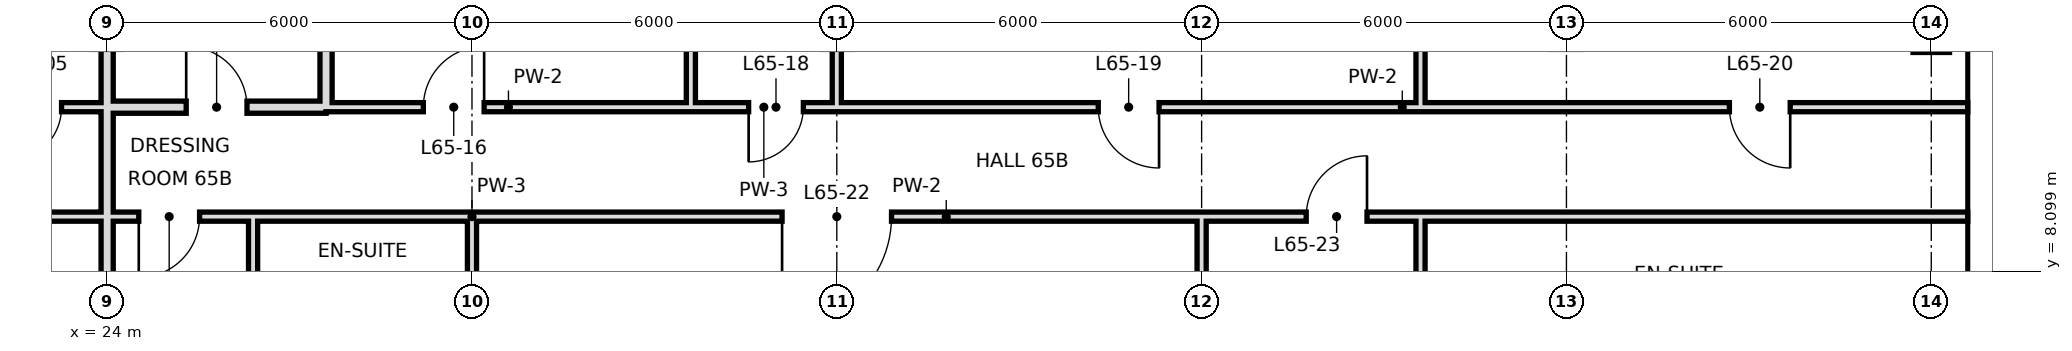
"""IFC4 building model, lengths in metres.
Left out: names, types, materials, properties, quantities, classifications, styles, units other than length and angle.
Written with IfcOpenShell. Run it as: python <this file> out.ifc"""

import sys

from ifc_helpers import new_model, si_unit, direction, frame, frame_2d, origin, place, context, subcontext, project, spatial, rectangle, extrude, element, fill, save


model = new_model("IFC4")
c1 = context("Model", 3, precision=1e-05, world=origin(), true_north=direction((0.0, 1.0)))
c2 = subcontext(c1, "Body", "Model", "MODEL_VIEW")
j1 = project(units=[si_unit("LENGTHUNIT", "METRE"), si_unit("PLANEANGLEUNIT", "RADIAN")], contexts=[c1])
p1 = place(None, origin())
s1 = spatial("IfcSite", under=j1, at=p1, CompositionType="ELEMENT")
p2 = place(p1, origin())
s2 = spatial("IfcBuilding", under=s1, at=p2, CompositionType="ELEMENT")
p3 = place(p2, frame((0.0, 0.0, 273.8)))
s3 = spatial("IfcBuildingStorey", under=s2, at=p3, CompositionType="ELEMENT", Elevation=273.8)
p4 = place(p3, frame((24.0, 10.8, 0.0), z_axis=(0.0, 0.0, 1.0), x_axis=(0.0, 1.0, 0.0)))
e1 = element("IfcWall", 1, at=p4, inside=s3, PredefinedType="SOLIDWALL", context=c2, shape_type="SweptSolid", body=[
    extrude(rectangle(XDim=7.9, YDim=0.2, at=frame_2d((3.95, 0.0))), origin(), (0.0, 0.0, 1.0), 2.72),
])
p5 = place(p3, frame((24.0, 0.0, 0.0), z_axis=(0.0, 0.0, 1.0), x_axis=(0.0, 1.0, 0.0)))
e2 = element("IfcWall", 2, at=p5, inside=s3, PredefinedType="SOLIDWALL", context=c2, shape_type="SweptSolid", body=[
    extrude(rectangle(XDim=10.8, YDim=0.2, at=frame_2d((5.4, 0.0))), origin(), (0.0, 0.0, 1.0), 2.72),
])
p6 = place(p3, frame((26.4, 6.0, 0.0), z_axis=(0.0, 0.0, 1.0), x_axis=(0.0, 1.0, 0.0)))
e3 = element("IfcWall", 3, at=p6, inside=s3, PredefinedType="PARTITIONING", context=c2, shape_type="SweptSolid", body=[
    extrude(rectangle(XDim=3.0, YDim=0.15, at=frame_2d((1.5, 0.0))), origin(), (0.0, 0.0, 1.0), 3.42),
])
p7 = place(p3, frame((27.6, 10.8, 0.0), z_axis=(0.0, 0.0, 1.0), x_axis=(0.0, 1.0, 0.0)))
e4 = element("IfcWall", 4, at=p7, inside=s3, PredefinedType="SOLIDWALL", context=c2, shape_type="SweptSolid", body=[
    extrude(rectangle(XDim=7.9, YDim=0.2, at=frame_2d((3.95, 0.0))), origin(), (0.0, 0.0, 1.0), 2.72),
])
p8 = place(p3, frame((30.0, 6.0, 0.0), z_axis=(0.0, 0.0, 1.0), x_axis=(0.0, 1.0, 0.0)))
e5 = element("IfcWall", 5, at=p8, inside=s3, PredefinedType="PARTITIONING", context=c2, shape_type="SweptSolid", body=[
    extrude(rectangle(XDim=3.0, YDim=0.15, at=frame_2d((1.5, 0.0))), origin(), (0.0, 0.0, 1.0), 2.72),
])
p9 = place(p3, frame((33.6, 10.8, 0.0), z_axis=(0.0, 0.0, 1.0), x_axis=(0.0, 1.0, 0.0)))
e6 = element("IfcWall", 6, at=p9, inside=s3, PredefinedType="PARTITIONING", context=c2, shape_type="SweptSolid", body=[
    extrude(rectangle(XDim=7.9, YDim=0.15, at=frame_2d((3.95, 0.0))), origin(), (0.0, 0.0, 1.0), 3.42),
])
p10 = place(p3, frame((36.0, 10.8, 0.0), z_axis=(0.0, 0.0, 1.0), x_axis=(0.0, 1.0, 0.0)))
e7 = element("IfcWall", 7, at=p10, inside=s3, PredefinedType="PARTITIONING", context=c2, shape_type="SweptSolid", body=[
    extrude(rectangle(XDim=7.9, YDim=0.15, at=frame_2d((3.95, 0.0))), origin(), (0.0, 0.0, 1.0), 2.72),
])
p11 = place(p3, frame((42.0, -0.6, 0.0), z_axis=(0.0, 0.0, 1.0), x_axis=(0.0, 1.0, 0.0)))
e8 = element("IfcWall", 8, at=p11, inside=s3, PredefinedType="PARTITIONING", context=c2, shape_type="SweptSolid", body=[
    extrude(rectangle(XDim=9.6, YDim=0.15, at=frame_2d((4.8, 0.0))), origin(), (0.0, 0.0, 1.0), 2.72),
])
p12 = place(p3, frame((45.6, 10.8, 0.0), z_axis=(0.0, 0.0, 1.0), x_axis=(0.0, 1.0, 0.0)))
e9 = element("IfcWall", 9, at=p12, inside=s3, PredefinedType="PARTITIONING", context=c2, shape_type="SweptSolid", body=[
    extrude(rectangle(XDim=7.2, YDim=0.15, at=frame_2d((3.6, 0.0))), origin(), (0.0, 0.0, 1.0), 3.42),
])
p13 = place(p3, frame((45.6, 6.0, 0.0), z_axis=(0.0, 0.0, 1.0), x_axis=(0.0, 1.0, 0.0)))
e10 = element("IfcWall", 10, at=p13, inside=s3, PredefinedType="PARTITIONING", context=c2, shape_type="SweptSolid", body=[
    extrude(rectangle(XDim=3.0, YDim=0.15, at=frame_2d((1.5, 0.0))), origin(), (0.0, 0.0, 1.0), 3.42),
])
p14 = place(p3, frame((24.0, 10.8, 0.0), z_axis=(0.0, 0.0, 1.0), x_axis=(1.0, 0.0, 0.0)))
e11 = element("IfcWall", 11, at=p14, inside=s3, PredefinedType="SOLIDWALL", context=c2, shape_type="SweptSolid", body=[
    extrude(rectangle(XDim=3.6, YDim=0.2, at=frame_2d((1.8, 0.0))), origin(), (0.0, 0.0, 1.0), 2.72),
])
p15 = place(p14, frame((1.3, 0.0, 0.0)))
e12 = element("IfcOpeningElement", 12, at=p15, cuts=e11, PredefinedType="OPENING", context=c2, shape_type="SweptSolid", body=[
    extrude(rectangle(XDim=1.0, YDim=2.4, at=frame_2d((0.5, 1.2))), frame((0.0, 0.11, 0.0), z_axis=(0.0, -1.0, 0.0), x_axis=(1.0, 0.0, 0.0)), (0.0, 0.0, 1.0), 0.22),
])
p16 = place(p3, frame((27.6, 10.8, 0.0), z_axis=(0.0, 0.0, 1.0), x_axis=(1.0, 0.0, 0.0)))
e13 = element("IfcWall", 13, at=p16, inside=s3, PredefinedType="PARTITIONING", context=c2, shape_type="SweptSolid", body=[
    extrude(rectangle(XDim=6.0, YDim=0.15, at=frame_2d((3.0, 0.0))), origin(), (0.0, 0.0, 1.0), 3.42),
])
p17 = place(p16, frame((1.6, 0.0, 0.0)))
e14 = element("IfcOpeningElement", 14, at=p17, cuts=e13, PredefinedType="OPENING", context=c2, shape_type="SweptSolid", body=[
    extrude(rectangle(XDim=1.0, YDim=2.4, at=frame_2d((0.5, 1.2))), frame((0.0, 0.085, 0.0), z_axis=(0.0, -1.0, 0.0), x_axis=(1.0, 0.0, 0.0)), (0.0, 0.0, 1.0), 0.17),
])
p18 = place(p3, frame((36.0, 10.8, 0.0), z_axis=(0.0, 0.0, 1.0), x_axis=(1.0, 0.0, 0.0)))
e15 = element("IfcWall", 15, at=p18, inside=s3, PredefinedType="PARTITIONING", context=c2, shape_type="SweptSolid", body=[
    extrude(rectangle(XDim=18.6, YDim=0.15, at=frame_2d((9.3, 0.0))), origin(), (0.0, 0.0, 1.0), 3.42),
])
p19 = place(p18, frame((4.3, 0.0, 0.0)))
e16 = element("IfcOpeningElement", 16, at=p19, cuts=e15, PredefinedType="OPENING", context=c2, shape_type="SweptSolid", body=[
    extrude(rectangle(XDim=1.0, YDim=2.4, at=frame_2d((0.5, 1.2))), frame((0.0, 0.085, 0.0), z_axis=(0.0, -1.0, 0.0), x_axis=(1.0, 0.0, 0.0)), (0.0, 0.0, 1.0), 0.17),
])
p20 = place(p18, frame((14.68, 0.0, 0.0)))
e17 = element("IfcOpeningElement", 17, at=p20, cuts=e15, PredefinedType="OPENING", context=c2, shape_type="SweptSolid", body=[
    extrude(rectangle(XDim=1.0, YDim=2.4, at=frame_2d((0.5, 1.2))), frame((0.0, 0.085, 0.0), z_axis=(0.0, -1.0, 0.0), x_axis=(1.0, 0.0, 0.0)), (0.0, 0.0, 1.0), 0.17),
])
p21 = place(p3, frame((21.6, 10.8, 0.0), z_axis=(0.0, 0.0, 1.0), x_axis=(1.0, 0.0, 0.0)))
e18 = element("IfcWall", 18, at=p21, inside=s3, PredefinedType="PARTITIONING", context=c2, shape_type="SweptSolid", body=[
    extrude(rectangle(XDim=2.4, YDim=0.15, at=frame_2d((1.2, 0.0))), origin(), (0.0, 0.0, 1.0), 3.42),
])
p22 = place(p21, frame((0.75, 0.0, 0.0)))
e19 = element("IfcOpeningElement", 19, at=p22, cuts=e18, PredefinedType="OPENING", context=c2, shape_type="SweptSolid", body=[
    extrude(rectangle(XDim=0.9, YDim=2.4, at=frame_2d((0.45, 1.2))), frame((0.0, 0.085, 0.0), z_axis=(0.0, -1.0, 0.0), x_axis=(1.0, 0.0, 0.0)), (0.0, 0.0, 1.0), 0.17),
])
p23 = place(p3, frame((33.6, 10.8, 0.0), z_axis=(0.0, 0.0, 1.0), x_axis=(1.0, 0.0, 0.0)))
e20 = element("IfcWall", 20, at=p23, inside=s3, PredefinedType="PARTITIONING", context=c2, shape_type="SweptSolid", body=[
    extrude(rectangle(XDim=2.4, YDim=0.15, at=frame_2d((1.2, 0.0))), origin(), (0.0, 0.0, 1.0), 3.42),
])
p24 = place(p23, frame((0.95, 0.0, 0.0)))
e21 = element("IfcOpeningElement", 21, at=p24, cuts=e20, PredefinedType="OPENING", context=c2, shape_type="SweptSolid", body=[
    extrude(rectangle(XDim=0.9, YDim=2.4, at=frame_2d((0.45, 1.2))), frame((0.0, 0.085, 0.0), z_axis=(0.0, -1.0, 0.0), x_axis=(1.0, 0.0, 0.0)), (0.0, 0.0, 1.0), 0.17),
])
p25 = place(p3, frame((24.0, 9.0, 0.0), z_axis=(0.0, 0.0, 1.0), x_axis=(1.0, 0.0, 0.0)))
e22 = element("IfcWall", 22, at=p25, inside=s3, PredefinedType="PARTITIONING", context=c2, shape_type="SweptSolid", body=[
    extrude(rectangle(XDim=2.4, YDim=0.15, at=frame_2d((1.2, 0.0))), origin(), (0.0, 0.0, 1.0), 3.42),
])
p26 = place(p25, frame((0.52, 0.0, 0.0)))
e23 = element("IfcOpeningElement", 23, at=p26, cuts=e22, PredefinedType="OPENING", context=c2, shape_type="SweptSolid", body=[
    extrude(rectangle(XDim=1.0, YDim=2.4, at=frame_2d((0.5, 1.2))), frame((0.0, 0.085, 0.0), z_axis=(0.0, -1.0, 0.0), x_axis=(1.0, 0.0, 0.0)), (0.0, 0.0, 1.0), 0.17),
])
p27 = place(p3, frame((30.0, 9.0, 0.0), z_axis=(0.0, 0.0, 1.0), x_axis=(1.0, 0.0, 0.0)))
e24 = element("IfcWall", 24, at=p27, inside=s3, PredefinedType="PARTITIONING", context=c2, shape_type="SweptSolid", body=[
    extrude(rectangle(XDim=15.6, YDim=0.15, at=frame_2d((7.8, 0.0))), origin(), (0.0, 0.0, 1.0), 3.42),
])
p28 = place(p27, frame((5.1, 0.0, 0.0)))
e25 = element("IfcOpeningElement", 25, at=p28, cuts=e24, PredefinedType="OPENING", context=c2, shape_type="SweptSolid", body=[
    extrude(rectangle(XDim=1.8, YDim=2.4, at=frame_2d((0.9, 1.2))), frame((0.0, 0.085, 0.0), z_axis=(0.0, -1.0, 0.0), x_axis=(1.0, 0.0, 0.0)), (0.0, 0.0, 1.0), 0.17),
])
p29 = place(p27, frame((13.72, 0.0, 0.0)))
e26 = element("IfcOpeningElement", 26, at=p29, cuts=e24, PredefinedType="OPENING", context=c2, shape_type="SweptSolid", body=[
    extrude(rectangle(XDim=1.0, YDim=2.4, at=frame_2d((0.5, 1.2))), frame((0.0, 0.085, 0.0), z_axis=(0.0, -1.0, 0.0), x_axis=(1.0, 0.0, 0.0)), (0.0, 0.0, 1.0), 0.17),
])
p30 = place(p3, frame((21.6, 9.0, 0.0), z_axis=(0.0, 0.0, 1.0), x_axis=(1.0, 0.0, 0.0)))
e27 = element("IfcWall", 27, at=p30, inside=s3, PredefinedType="PARTITIONING", context=c2, shape_type="SweptSolid", body=[
    extrude(rectangle(XDim=2.4, YDim=0.15, at=frame_2d((1.2, 0.0))), origin(), (0.0, 0.0, 1.0), 3.42),
])
p31 = place(p3, frame((26.4, 9.0, 0.0), z_axis=(0.0, 0.0, 1.0), x_axis=(1.0, 0.0, 0.0)))
e28 = element("IfcWall", 28, at=p31, inside=s3, PredefinedType="PARTITIONING", context=c2, shape_type="SweptSolid", body=[
    extrude(rectangle(XDim=3.6, YDim=0.15, at=frame_2d((1.8, 0.0))), origin(), (0.0, 0.0, 1.0), 3.42),
])
p32 = place(p3, frame((45.6, 9.0, 0.0), z_axis=(0.0, 0.0, 1.0), x_axis=(1.0, 0.0, 0.0)))
e29 = element("IfcWall", 29, at=p32, inside=s3, PredefinedType="PARTITIONING", context=c2, shape_type="SweptSolid", body=[
    extrude(rectangle(XDim=9.0, YDim=0.15, at=frame_2d((4.5, 0.0))), origin(), (0.0, 0.0, 1.0), 3.42),
])
p33 = place(p22, frame((0.9, 0.0, 0.0), z_axis=(0.0, 0.0, 1.0), x_axis=(-1.0, 0.0, 0.0)))
e30 = element("IfcDoor", 30, at=p33, inside=s3, OperationType="SINGLE_SWING_RIGHT", PredefinedType="DOOR", context=c2, shape_type="SweptSolid", body=[
    extrude(rectangle(XDim=0.9, YDim=2.4, at=frame_2d((0.45, 1.2))), frame((0.0, 0.025, 0.0), z_axis=(0.0, -1.0, 0.0), x_axis=(1.0, 0.0, 0.0)), (0.0, 0.0, 1.0), 0.05),
])
fill(e19, e30)
p34 = place(p17, frame((1.0, 0.0, 0.0), z_axis=(0.0, 0.0, 1.0), x_axis=(-1.0, 0.0, 0.0)))
e31 = element("IfcDoor", 31, at=p34, inside=s3, OperationType="SINGLE_SWING_LEFT", PredefinedType="DOOR", context=c2, shape_type="SweptSolid", body=[
    extrude(rectangle(XDim=1.0, YDim=2.4, at=frame_2d((0.5, 1.2))), frame((0.0, 0.025, 0.0), z_axis=(0.0, -1.0, 0.0), x_axis=(1.0, 0.0, 0.0)), (0.0, 0.0, 1.0), 0.05),
])
fill(e14, e31)
p35 = place(p15, origin())
e32 = element("IfcDoor", 32, at=p35, inside=s3, OperationType="SINGLE_SWING_LEFT", PredefinedType="DOOR", context=c2, shape_type="SweptSolid", body=[
    extrude(rectangle(XDim=1.0, YDim=2.4, at=frame_2d((0.5, 1.2))), frame((0.0, 0.025, 0.0), z_axis=(0.0, -1.0, 0.0), x_axis=(1.0, 0.0, 0.0)), (0.0, 0.0, 1.0), 0.05),
])
fill(e12, e32)
p36 = place(p24, frame((0.9, 0.0, 0.0), z_axis=(0.0, 0.0, 1.0), x_axis=(-1.0, 0.0, 0.0)))
e33 = element("IfcDoor", 33, at=p36, inside=s3, OperationType="SINGLE_SWING_RIGHT", PredefinedType="DOOR", context=c2, shape_type="SweptSolid", body=[
    extrude(rectangle(XDim=0.9, YDim=2.4, at=frame_2d((0.45, 1.2))), frame((0.0, 0.025, 0.0), z_axis=(0.0, -1.0, 0.0), x_axis=(1.0, 0.0, 0.0)), (0.0, 0.0, 1.0), 0.05),
])
fill(e21, e33)
p37 = place(p19, origin())
e34 = element("IfcDoor", 34, at=p37, inside=s3, OperationType="SINGLE_SWING_RIGHT", PredefinedType="DOOR", context=c2, shape_type="SweptSolid", body=[
    extrude(rectangle(XDim=1.0, YDim=2.4, at=frame_2d((0.5, 1.2))), frame((0.0, 0.025, 0.0), z_axis=(0.0, -1.0, 0.0), x_axis=(1.0, 0.0, 0.0)), (0.0, 0.0, 1.0), 0.05),
])
fill(e16, e34)
p38 = place(p20, origin())
e35 = element("IfcDoor", 35, at=p38, inside=s3, OperationType="SINGLE_SWING_RIGHT", PredefinedType="DOOR", context=c2, shape_type="SweptSolid", body=[
    extrude(rectangle(XDim=1.0, YDim=2.4, at=frame_2d((0.5, 1.2))), frame((0.0, 0.025, 0.0), z_axis=(0.0, -1.0, 0.0), x_axis=(1.0, 0.0, 0.0)), (0.0, 0.0, 1.0), 0.05),
])
fill(e17, e35)
p39 = place(p26, frame((1.0, 0.0, 0.0), z_axis=(0.0, 0.0, 1.0), x_axis=(-1.0, 0.0, 0.0)))
e36 = element("IfcDoor", 36, at=p39, inside=s3, OperationType="SINGLE_SWING_RIGHT", PredefinedType="DOOR", context=c2, shape_type="SweptSolid", body=[
    extrude(rectangle(XDim=1.0, YDim=2.4, at=frame_2d((0.5, 1.2))), frame((0.0, 0.025, 0.0), z_axis=(0.0, -1.0, 0.0), x_axis=(1.0, 0.0, 0.0)), (0.0, 0.0, 1.0), 0.05),
])
fill(e23, e36)
p40 = place(p28, frame((1.8, 0.0, 0.0), z_axis=(0.0, 0.0, 1.0), x_axis=(-1.0, 0.0, 0.0)))
e37 = element("IfcDoor", 37, at=p40, inside=s3, OperationType="SINGLE_SWING_RIGHT", PredefinedType="DOOR", context=c2, shape_type="SweptSolid", body=[
    extrude(rectangle(XDim=1.8, YDim=2.4, at=frame_2d((0.9, 1.2))), frame((0.0, 0.025, 0.0), z_axis=(0.0, -1.0, 0.0), x_axis=(1.0, 0.0, 0.0)), (0.0, 0.0, 1.0), 0.05),
])
fill(e25, e37)
p41 = place(p29, frame((1.0, 0.0, 0.0), z_axis=(0.0, 0.0, 1.0), x_axis=(-1.0, 0.0, 0.0)))
e38 = element("IfcDoor", 38, at=p41, inside=s3, OperationType="SINGLE_SWING_LEFT", PredefinedType="DOOR", context=c2, shape_type="SweptSolid", body=[
    extrude(rectangle(XDim=1.0, YDim=2.4, at=frame_2d((0.5, 1.2))), frame((0.0, 0.025, 0.0), z_axis=(0.0, -1.0, 0.0), x_axis=(1.0, 0.0, 0.0)), (0.0, 0.0, 1.0), 0.05),
])
fill(e26, e38)
save(model, sys.argv[1])
